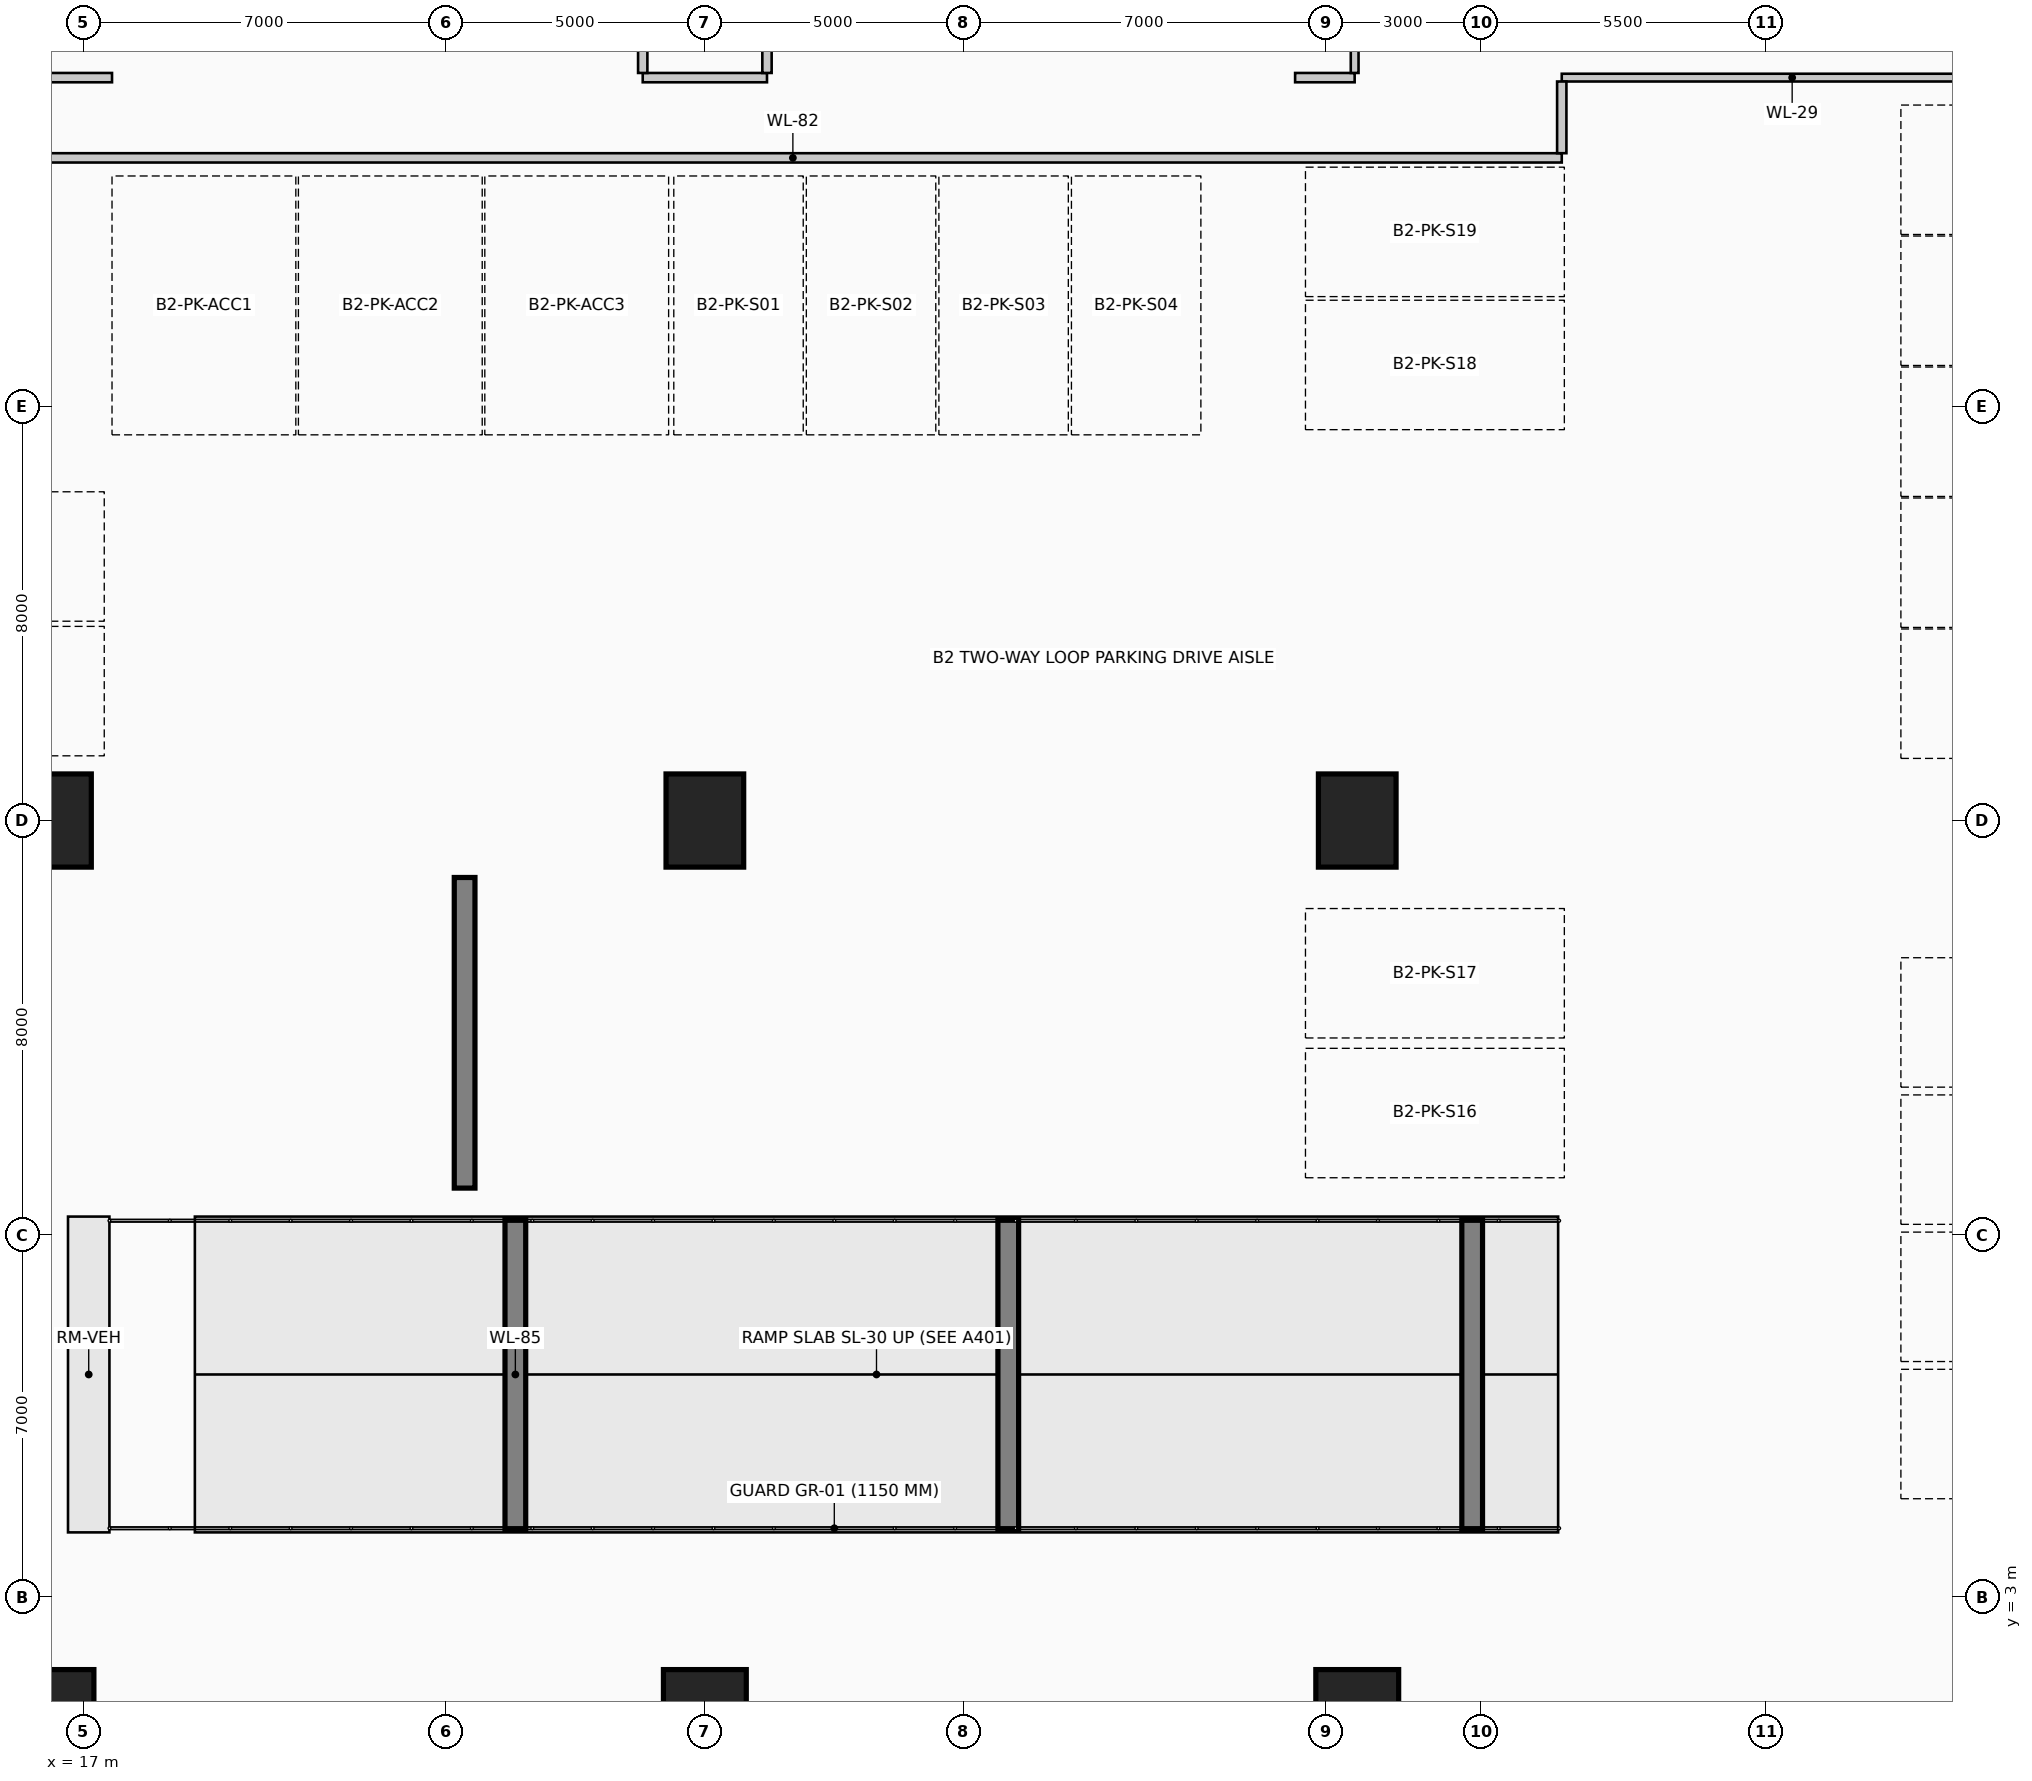
"""IFC4 building model, lengths in metres.
Left out: names, types, materials, properties, quantities, classifications, styles, units other than length and angle.
Written with IfcOpenShell. Run it as: python <this file> out.ifc"""

import sys

from ifc_helpers import new_model, si_unit, direction, frame, frame_2d, origin, origin_2d, place, context, subcontext, project, spatial, rectangle, extrude, element, save


model = new_model("IFC4")
c1 = context("Model", 3, precision=1e-05, world=origin(), true_north=direction((0.0, 1.0)))
c2 = subcontext(c1, "Body", "Model", "MODEL_VIEW")
j1 = project(units=[si_unit("LENGTHUNIT", "METRE"), si_unit("PLANEANGLEUNIT", "RADIAN")], contexts=[c1])
p1 = place(None, origin())
s1 = spatial("IfcSite", under=j1, at=p1, CompositionType="ELEMENT")
p2 = place(p1, origin())
s2 = spatial("IfcBuilding", under=s1, at=p2, CompositionType="ELEMENT")
p3 = place(p2, frame((0.0, 0.0, -9.0)))
s3 = spatial("IfcBuildingStorey", under=s2, at=p3, CompositionType="ELEMENT", Elevation=-9.0)
for number, where, z_axis, x_axis in (
    (1, (16.4, 0.6, 0.0), (0.0, 0.0, 1.0), (1.0, 0.0, 0.0)),
    (2, (29.0, 0.6, 0.0), (0.0, 0.0, 1.0), (1.0, 0.0, 0.0)),
    (3, (41.6, 0.6, 0.0), (0.0, 0.0, 1.0), (1.0, 0.0, 0.0)),
):
    element("IfcColumn", number, at=place(p3, frame(where, z_axis=z_axis, x_axis=x_axis)), inside=s3, PredefinedType="COLUMN", context=c2, shape_type="SweptSolid", body=[
        extrude(rectangle(XDim=1.6, YDim=2.0, at=origin_2d()), origin(), (0.0, 0.0, 1.0), 4.5),
    ])
for number, where, z_axis, x_axis in (
    (4, (16.4, 18.0, 0.0), (0.0, 0.0, 1.0), (1.0, 0.0, 0.0)),
    (5, (29.0, 18.0, 0.0), (0.0, 0.0, 1.0), (1.0, 0.0, 0.0)),
    (6, (41.6, 18.0, 0.0), (0.0, 0.0, 1.0), (1.0, 0.0, 0.0)),
):
    element("IfcColumn", number, at=place(p3, frame(where, z_axis=z_axis, x_axis=x_axis)), inside=s3, PredefinedType="COLUMN", context=c2, shape_type="SweptSolid", body=[
        extrude(rectangle(XDim=1.5, YDim=1.8, at=origin_2d()), origin(), (0.0, 0.0, 1.0), 4.5),
    ])
p4 = place(p3, frame((25.34, 4.3, 0.0), z_axis=(0.0, 0.0, 1.0), x_axis=(0.0, 1.0, 0.0)))
e7 = element("IfcWall", 7, at=p4, inside=s3, PredefinedType="SHEAR", context=c2, shape_type="SweptSolid", body=[
    extrude(rectangle(XDim=6.0, YDim=0.4, at=frame_2d((3.0, 0.0))), origin(), (0.0, 0.0, 1.0), 1.002),
])
p5 = place(p3, frame((34.86, 4.3, 0.0), z_axis=(0.0, 0.0, 1.0), x_axis=(0.0, 1.0, 0.0)))
e8 = element("IfcWall", 8, at=p5, inside=s3, PredefinedType="SHEAR", context=c2, shape_type="SweptSolid", body=[
    extrude(rectangle(XDim=6.0, YDim=0.4, at=frame_2d((3.0, 0.0))), origin(), (0.0, 0.0, 1.0), 2.532),
])
p6 = place(p3, frame((43.82, 4.3, 0.0), z_axis=(0.0, 0.0, 1.0), x_axis=(0.0, 1.0, 0.0)))
e9 = element("IfcWall", 9, at=p6, inside=s3, PredefinedType="SHEAR", context=c2, shape_type="SweptSolid", body=[
    extrude(rectangle(XDim=6.0, YDim=0.4, at=frame_2d((3.0, 0.0))), origin(), (0.0, 0.0, 1.0), 3.972),
])
p7 = place(p3, frame((24.36, 10.9, 0.0), z_axis=(0.0, 0.0, 1.0), x_axis=(0.0, 1.0, 0.0)))
e10 = element("IfcWall", 10, at=p7, inside=s3, PredefinedType="SHEAR", context=c2, shape_type="SweptSolid", body=[
    extrude(rectangle(XDim=6.0, YDim=0.4, at=frame_2d((3.0, 0.0))), origin(), (0.0, 0.0, 1.0), 4.1),
])
p8 = place(p3, frame((15.85, 30.8, 0.0), z_axis=(0.0, 0.0, 1.0), x_axis=(1.0, 0.0, 0.0)))
e11 = element("IfcWall", 11, at=p8, inside=s3, PredefinedType="PARTITIONING", context=c2, shape_type="SweptSolid", body=[
    extrude(rectangle(XDim=29.7, YDim=0.18, at=frame_2d((14.85, 0.0))), origin(), (0.0, 0.0, 1.0), 4.1),
])
p9 = place(p3, frame((15.85, 32.35, 0.0), z_axis=(0.0, 0.0, 1.0), x_axis=(1.0, 0.0, 0.0)))
e12 = element("IfcWall", 12, at=p9, inside=s3, PredefinedType="PARTITIONING", context=c2, shape_type="SweptSolid", body=[
    extrude(rectangle(XDim=1.7, YDim=0.18, at=frame_2d((0.85, 0.0))), origin(), (0.0, 0.0, 1.0), 4.1),
])
p10 = place(p3, frame((27.8, 32.35, 0.0), z_axis=(0.0, 0.0, 1.0), x_axis=(1.0, 0.0, 0.0)))
e13 = element("IfcWall", 13, at=p10, inside=s3, PredefinedType="PARTITIONING", context=c2, shape_type="SweptSolid", body=[
    extrude(rectangle(XDim=2.4, YDim=0.18, at=frame_2d((1.2, 0.0))), origin(), (0.0, 0.0, 1.0), 4.1),
])
p11 = place(p3, frame((40.4, 32.35, 0.0), z_axis=(0.0, 0.0, 1.0), x_axis=(1.0, 0.0, 0.0)))
e14 = element("IfcWall", 14, at=p11, inside=s3, PredefinedType="PARTITIONING", context=c2, shape_type="SweptSolid", body=[
    extrude(rectangle(XDim=1.15, YDim=0.18, at=frame_2d((0.575, 0.0))), origin(), (0.0, 0.0, 1.0), 4.1),
])
p12 = place(p3, frame((45.55, 32.35, 0.0), z_axis=(0.0, 0.0, 1.0), x_axis=(1.0, 0.0, 0.0)))
e15 = element("IfcWall", 15, at=p12, inside=s3, PredefinedType="PARTITIONING", context=c2, shape_type="SweptSolid", body=[
    extrude(rectangle(XDim=8.9, YDim=0.15, at=frame_2d((4.45, 0.0))), origin(), (0.0, 0.0, 1.0), 4.1),
])
for number, where, z_axis, x_axis in (
    (16, (27.8, 32.44, 0.0), (0.0, 0.0, 1.0), (0.0, 1.0, 0.0)),
    (17, (30.2, 32.44, 0.0), (0.0, 0.0, 1.0), (0.0, 1.0, 0.0)),
):
    element("IfcWall", number, at=place(p3, frame(where, z_axis=z_axis, x_axis=x_axis)), inside=s3, PredefinedType="PARTITIONING", context=c2, shape_type="SweptSolid", body=[
        extrude(rectangle(XDim=2.55, YDim=0.18, at=frame_2d((1.275, 0.0))), origin(), (0.0, 0.0, 1.0), 4.1),
    ])
p13 = place(p3, frame((41.55, 32.44, 0.0), z_axis=(0.0, 0.0, 1.0), x_axis=(0.0, 1.0, 0.0)))
e18 = element("IfcWall", 18, at=p13, inside=s3, PredefinedType="PARTITIONING", context=c2, shape_type="SweptSolid", body=[
    extrude(rectangle(XDim=0.66, YDim=0.15, at=frame_2d((0.33, 0.0))), origin(), (0.0, 0.0, 1.0), 3.145),
])
p14 = place(p3, frame((45.55, 30.89, 0.0), z_axis=(0.0, 0.0, 1.0), x_axis=(0.0, 1.0, 0.0)))
e19 = element("IfcWall", 19, at=p14, inside=s3, PredefinedType="PARTITIONING", context=c2, shape_type="SweptSolid", body=[
    extrude(rectangle(XDim=1.385, YDim=0.18, at=frame_2d((0.692, 0.0))), origin(), (0.0, 0.0, 1.0), 4.1),
])
save(model, sys.argv[1])
